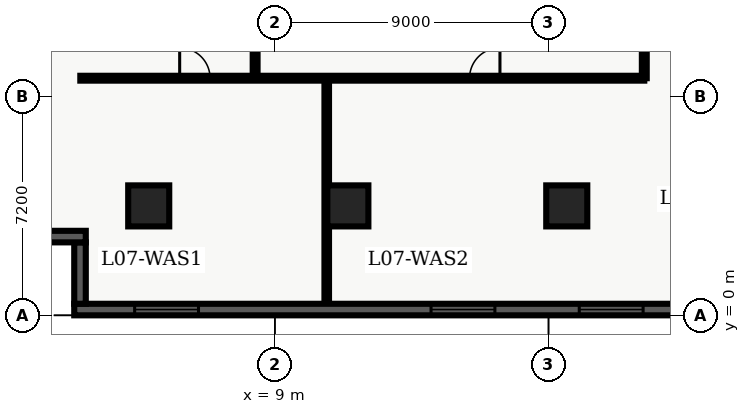
"""IFC4 building model, lengths in metres.
Left out: names, types, materials, properties, quantities, classifications, styles, units other than length and angle.
Written with IfcOpenShell. Run it as: python <this file> out.ifc"""

import sys

from ifc_helpers import new_model, entity, si_unit, converted_unit, direction, frame, origin_with_axes, origin_2d_with_axis, place, context, subcontext, project, spatial, polyline, rectangle, outline, extrude, element, fill, save


model = new_model("IFC4")
c1 = context("Model", 3, precision=1e-05, world=origin_with_axes(), true_north=direction((0.0, 1.0)))
c2 = subcontext(c1, "Body", "Model", "MODEL_VIEW")
j1 = project(units=[si_unit("LENGTHUNIT", "METRE"), converted_unit("PLANEANGLEUNIT", "DEGREE", entity("IfcPlaneAngleMeasure", 0.017), si_unit("PLANEANGLEUNIT", "RADIAN"), dimensions=[0, 0, 0, 0, 0, 0, 0])], contexts=[c1])
p1 = place(None, origin_with_axes())
s1 = spatial("IfcSite", under=j1, at=p1, CompositionType="ELEMENT")
p2 = place(p1, origin_with_axes())
s2 = spatial("IfcBuilding", under=s1, at=p2, CompositionType="ELEMENT")
p3 = place(p2, frame((0.0, 0.0, 32.7), z_axis=(0.0, 0.0, 1.0), x_axis=(1.0, 0.0, 0.0)))
s3 = spatial("IfcBuildingStorey", under=s2, at=p3, CompositionType="ELEMENT", Elevation=32.7)
for number, where, z_axis, x_axis in (
    (1, (11.4, 3.6, 0.0), (0.0, 0.0, 1.0), (1.0, 0.0, 0.0)),
    (2, (18.6, 3.6, 0.0), (0.0, 0.0, 1.0), (1.0, 0.0, 0.0)),
    (3, (4.85, 3.6, 0.0), (0.0, 0.0, 1.0), (1.0, 0.0, 0.0)),
):
    element("IfcColumn", number, at=place(p3, frame(where, z_axis=z_axis, x_axis=x_axis)), inside=s3, PredefinedType="COLUMN", context=c2, shape_type="SweptSolid", body=[
        extrude(rectangle(XDim=1.35, YDim=1.35, at=origin_2d_with_axis()), origin_with_axes(), (0.0, 0.0, 1.0), 3.9),
    ])
p4 = place(p3, frame((2.6, 7.8, 0.0), z_axis=(0.0, 0.0, 1.0), x_axis=(1.0, 0.0, 0.0)))
e4 = element("IfcWall", 4, at=p4, inside=s3, PredefinedType="PARTITIONING", context=c2, shape_type="SweptSolid", body=[
    extrude(outline(polyline([(0.0, -0.08), (18.55, -0.08), (18.55, 0.08), (0.0, 0.08), (0.0, -0.08)])), origin_with_axes(), (0.0, 0.0, 1.0), 2.7),
])
p5 = place(p4, frame((3.768, 0.0, 0.0), z_axis=(0.0, 0.0, 1.0), x_axis=(1.0, 0.0, 0.0)))
e5 = element("IfcOpeningElement", 5, at=p5, cuts=e4, PredefinedType="OPENING", context=c2, shape_type="SweptSolid", body=[
    extrude(rectangle(XDim=1.0, YDim=0.18, at=origin_2d_with_axis()), origin_with_axes(), (0.0, 0.0, 1.0), 2.15),
])
p6 = place(p4, frame((13.303, 0.0, 0.0), z_axis=(0.0, 0.0, 1.0), x_axis=(1.0, 0.0, 0.0)))
e6 = element("IfcOpeningElement", 6, at=p6, cuts=e4, PredefinedType="OPENING", context=c2, shape_type="SweptSolid", body=[
    extrude(rectangle(XDim=1.0, YDim=0.18, at=origin_2d_with_axis()), origin_with_axes(), (0.0, 0.0, 1.0), 2.15),
])
p7 = place(p3, frame((21.15, 7.8, 0.0), z_axis=(0.0, 0.0, 1.0), x_axis=(0.0, 1.0, 0.0)))
e7 = element("IfcWall", 7, at=p7, inside=s3, PredefinedType="PARTITIONING", context=c2, shape_type="SweptSolid", body=[
    extrude(outline(polyline([(0.0, -0.08), (32.7, -0.08), (32.7, 0.08), (0.0, 0.08), (0.0, -0.08)])), origin_with_axes(), (0.0, 0.0, 1.0), 2.7),
])
p8 = place(p7, frame((5.775, 0.0, 0.0), z_axis=(0.0, 0.0, 1.0), x_axis=(1.0, 0.0, 0.0)))
e8 = element("IfcOpeningElement", 8, at=p8, cuts=e7, PredefinedType="OPENING", context=c2, shape_type="SweptSolid", body=[
    extrude(rectangle(XDim=1.05, YDim=0.18, at=origin_2d_with_axis()), origin_with_axes(), (0.0, 0.0, 1.0), 2.15),
])
p9 = place(p3, frame((8.35, 7.8, 0.0), z_axis=(0.0, 0.0, 1.0), x_axis=(0.0, 1.0, 0.0)))
e9 = element("IfcWall", 9, at=p9, inside=s3, PredefinedType="PARTITIONING", context=c2, shape_type="SweptSolid", body=[
    extrude(outline(polyline([(0.0, -0.08), (12.6, -0.08), (12.6, 0.08), (0.0, 0.08), (0.0, -0.08)])), origin_with_axes(), (0.0, 0.0, 1.0), 2.7),
])
p10 = place(p9, frame((6.325, 0.0, 0.0), z_axis=(0.0, 0.0, 1.0), x_axis=(1.0, 0.0, 0.0)))
e10 = element("IfcOpeningElement", 10, at=p10, cuts=e9, PredefinedType="OPENING", context=c2, shape_type="SweptSolid", body=[
    extrude(rectangle(XDim=1.0, YDim=0.18, at=origin_2d_with_axis()), origin_with_axes(), (0.0, 0.0, 1.0), 2.15),
])
p11 = place(p3, frame((10.705, 0.36, 0.0), z_axis=(0.0, 0.0, 1.0), x_axis=(0.0, 1.0, 0.0)))
e11 = element("IfcWall", 11, at=p11, inside=s3, PredefinedType="PARTITIONING", context=c2, shape_type="SweptSolid", body=[
    extrude(outline(polyline([(0.0, -0.075), (7.34, -0.075), (7.34, 0.075), (0.0, 0.075), (0.0, -0.075)])), origin_with_axes(), (0.0, 0.0, 1.0), 2.7),
])
p12 = place(p3, frame((57.22, 0.19, 0.0), z_axis=(0.0, 0.0, 1.0), x_axis=(-1.0, 0.0, 0.0)))
e12 = element("IfcWall", 12, at=p12, inside=s3, PredefinedType="SOLIDWALL", context=c2, shape_type="SweptSolid", body=[
    extrude(outline(polyline([(0.0, -0.19), (54.82, -0.19), (54.82, 0.19), (0.0, 0.19), (0.0, -0.19)])), origin_with_axes(), (0.0, 0.0, 1.0), 3.66),
])
p13 = place(p12, frame((3.037, 0.0, 0.45), z_axis=(0.0, 0.0, 1.0), x_axis=(1.0, 0.0, 0.0)))
e13 = element("IfcOpeningElement", 13, at=p13, cuts=e12, PredefinedType="OPENING", context=c2, shape_type="SweptSolid", body=[
    extrude(rectangle(XDim=2.1, YDim=0.4, at=origin_2d_with_axis()), origin_with_axes(), (0.0, 0.0, 1.0), 2.2),
])
p14 = place(p12, frame((7.912, 0.0, 0.45), z_axis=(0.0, 0.0, 1.0), x_axis=(1.0, 0.0, 0.0)))
e14 = element("IfcOpeningElement", 14, at=p14, cuts=e12, PredefinedType="OPENING", context=c2, shape_type="SweptSolid", body=[
    extrude(rectangle(XDim=2.1, YDim=0.4, at=origin_2d_with_axis()), origin_with_axes(), (0.0, 0.0, 1.0), 2.2),
])
p15 = place(p12, frame((12.786, 0.0, 0.45), z_axis=(0.0, 0.0, 1.0), x_axis=(1.0, 0.0, 0.0)))
e15 = element("IfcOpeningElement", 15, at=p15, cuts=e12, PredefinedType="OPENING", context=c2, shape_type="SweptSolid", body=[
    extrude(rectangle(XDim=2.1, YDim=0.4, at=origin_2d_with_axis()), origin_with_axes(), (0.0, 0.0, 1.0), 2.2),
])
p16 = place(p12, frame((17.661, 0.0, 0.45), z_axis=(0.0, 0.0, 1.0), x_axis=(1.0, 0.0, 0.0)))
e16 = element("IfcOpeningElement", 16, at=p16, cuts=e12, PredefinedType="OPENING", context=c2, shape_type="SweptSolid", body=[
    extrude(rectangle(XDim=2.1, YDim=0.4, at=origin_2d_with_axis()), origin_with_axes(), (0.0, 0.0, 1.0), 2.2),
])
p17 = place(p12, frame((22.535, 0.0, 0.45), z_axis=(0.0, 0.0, 1.0), x_axis=(1.0, 0.0, 0.0)))
e17 = element("IfcOpeningElement", 17, at=p17, cuts=e12, PredefinedType="OPENING", context=c2, shape_type="SweptSolid", body=[
    extrude(rectangle(XDim=2.1, YDim=0.4, at=origin_2d_with_axis()), origin_with_axes(), (0.0, 0.0, 1.0), 2.2),
])
p18 = place(p12, frame((27.41, 0.0, 0.45), z_axis=(0.0, 0.0, 1.0), x_axis=(1.0, 0.0, 0.0)))
e18 = element("IfcOpeningElement", 18, at=p18, cuts=e12, PredefinedType="OPENING", context=c2, shape_type="SweptSolid", body=[
    extrude(rectangle(XDim=2.1, YDim=0.4, at=origin_2d_with_axis()), origin_with_axes(), (0.0, 0.0, 1.0), 2.2),
])
p19 = place(p12, frame((32.285, 0.0, 0.45), z_axis=(0.0, 0.0, 1.0), x_axis=(1.0, 0.0, 0.0)))
e19 = element("IfcOpeningElement", 19, at=p19, cuts=e12, PredefinedType="OPENING", context=c2, shape_type="SweptSolid", body=[
    extrude(rectangle(XDim=2.1, YDim=0.4, at=origin_2d_with_axis()), origin_with_axes(), (0.0, 0.0, 1.0), 2.2),
])
p20 = place(p12, frame((37.159, 0.0, 0.45), z_axis=(0.0, 0.0, 1.0), x_axis=(1.0, 0.0, 0.0)))
e20 = element("IfcOpeningElement", 20, at=p20, cuts=e12, PredefinedType="OPENING", context=c2, shape_type="SweptSolid", body=[
    extrude(rectangle(XDim=2.1, YDim=0.4, at=origin_2d_with_axis()), origin_with_axes(), (0.0, 0.0, 1.0), 2.2),
])
p21 = place(p12, frame((42.034, 0.0, 0.45), z_axis=(0.0, 0.0, 1.0), x_axis=(1.0, 0.0, 0.0)))
e21 = element("IfcOpeningElement", 21, at=p21, cuts=e12, PredefinedType="OPENING", context=c2, shape_type="SweptSolid", body=[
    extrude(rectangle(XDim=2.1, YDim=0.4, at=origin_2d_with_axis()), origin_with_axes(), (0.0, 0.0, 1.0), 2.2),
])
p22 = place(p12, frame((51.783, 0.0, 0.45), z_axis=(0.0, 0.0, 1.0), x_axis=(1.0, 0.0, 0.0)))
e22 = element("IfcOpeningElement", 22, at=p22, cuts=e12, PredefinedType="OPENING", context=c2, shape_type="SweptSolid", body=[
    extrude(rectangle(XDim=2.1, YDim=0.4, at=origin_2d_with_axis()), origin_with_axes(), (0.0, 0.0, 1.0), 2.2),
])
p23 = place(p3, frame((2.59, 0.38, 0.0), z_axis=(0.0, 0.0, 1.0), x_axis=(0.0, 1.0, 0.0)))
e23 = element("IfcWall", 23, at=p23, inside=s3, PredefinedType="SOLIDWALL", context=c2, shape_type="SweptSolid", body=[
    extrude(outline(polyline([(0.0, -0.19), (2.02, -0.19), (2.02, 0.19), (0.0, 0.19), (0.0, -0.19)])), origin_with_axes(), (0.0, 0.0, 1.0), 3.66),
])
p24 = place(p3, frame((2.78, 2.59, 0.0), z_axis=(0.0, 0.0, 1.0), x_axis=(-1.0, 0.0, 0.0)))
e24 = element("IfcWall", 24, at=p24, inside=s3, PredefinedType="SOLIDWALL", context=c2, shape_type="SweptSolid", body=[
    extrude(outline(polyline([(0.0, -0.19), (2.78, -0.19), (2.78, 0.19), (0.0, 0.19), (0.0, -0.19)])), origin_with_axes(), (0.0, 0.0, 1.0), 3.66),
])
p25 = place(p4, frame((3.768, 0.0, 0.0), z_axis=(0.0, 0.0, 1.0), x_axis=(1.0, 0.0, 0.0)))
e25 = element("IfcDoor", 25, at=p25, inside=s3, OperationType="SINGLE_SWING_LEFT", PredefinedType="DOOR", context=c2, shape_type="SweptSolid", body=[
    extrude(rectangle(XDim=1.0, YDim=0.09, at=origin_2d_with_axis()), origin_with_axes(), (0.0, 0.0, 1.0), 2.15),
])
fill(e5, e25)
p26 = place(p4, frame((13.303, 0.0, 0.0), z_axis=(0.0, 0.0, 1.0), x_axis=(1.0, 0.0, 0.0)))
e26 = element("IfcDoor", 26, at=p26, inside=s3, OperationType="SINGLE_SWING_RIGHT", PredefinedType="DOOR", context=c2, shape_type="SweptSolid", body=[
    extrude(rectangle(XDim=1.0, YDim=0.09, at=origin_2d_with_axis()), origin_with_axes(), (0.0, 0.0, 1.0), 2.15),
])
fill(e6, e26)
p27 = place(p12, frame((37.159, 0.0, 0.45), z_axis=(0.0, 0.0, 1.0), x_axis=(1.0, 0.0, 0.0)))
e27 = element("IfcWindow", 27, at=p27, inside=s3, PredefinedType="WINDOW", context=c2, shape_type="SweptSolid", body=[
    extrude(rectangle(XDim=2.1, YDim=0.09, at=origin_2d_with_axis()), origin_with_axes(), (0.0, 0.0, 1.0), 2.2),
])
fill(e20, e27)
p28 = place(p12, frame((42.034, 0.0, 0.45), z_axis=(0.0, 0.0, 1.0), x_axis=(1.0, 0.0, 0.0)))
e28 = element("IfcWindow", 28, at=p28, inside=s3, PredefinedType="WINDOW", context=c2, shape_type="SweptSolid", body=[
    extrude(rectangle(XDim=2.1, YDim=0.09, at=origin_2d_with_axis()), origin_with_axes(), (0.0, 0.0, 1.0), 2.2),
])
fill(e21, e28)
p29 = place(p12, frame((51.783, 0.0, 0.45), z_axis=(0.0, 0.0, 1.0), x_axis=(1.0, 0.0, 0.0)))
e29 = element("IfcWindow", 29, at=p29, inside=s3, PredefinedType="WINDOW", context=c2, shape_type="SweptSolid", body=[
    extrude(rectangle(XDim=2.1, YDim=0.09, at=origin_2d_with_axis()), origin_with_axes(), (0.0, 0.0, 1.0), 2.2),
])
fill(e22, e29)
save(model, sys.argv[1])
